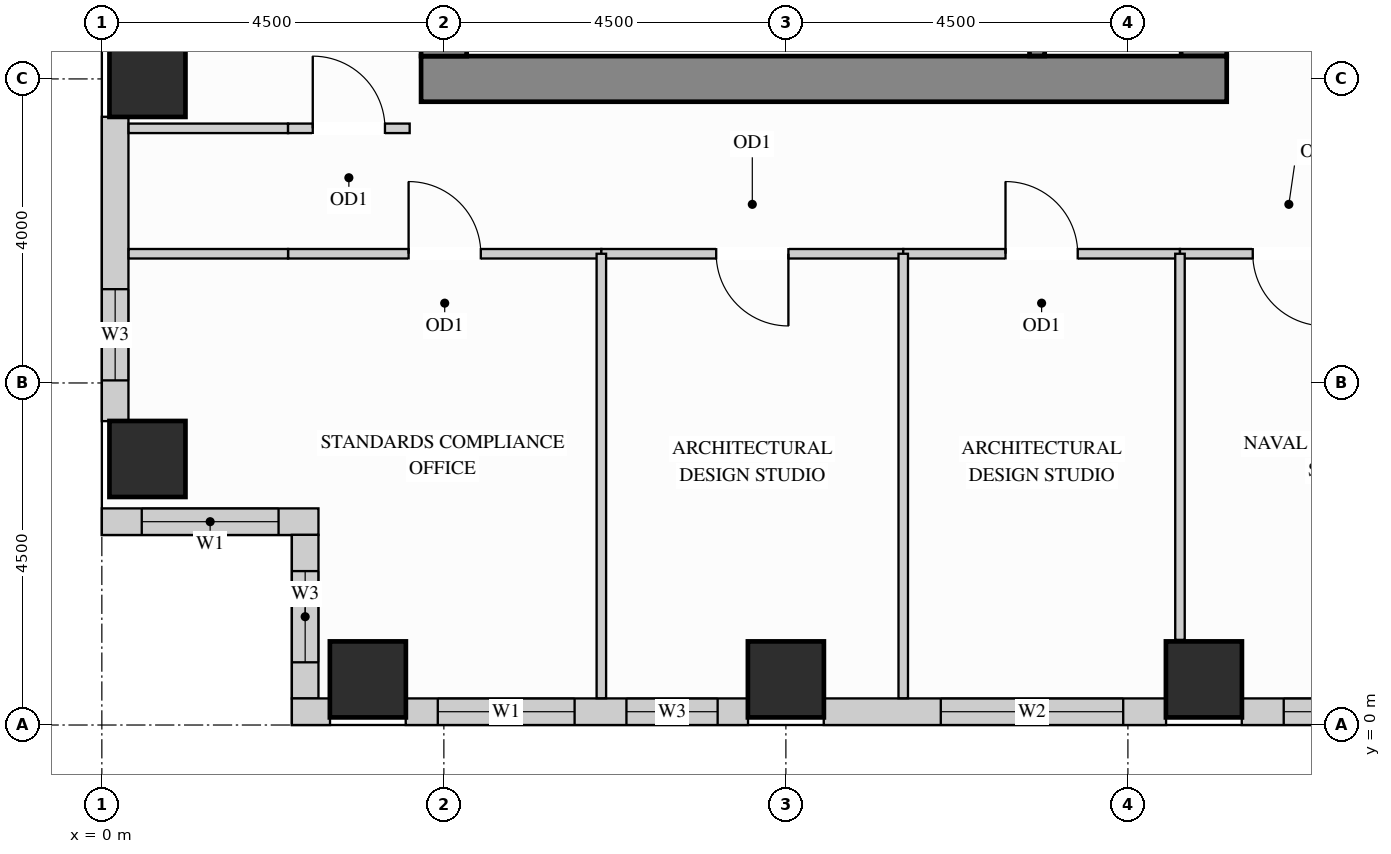
"""IFC4 building model, lengths in metres.
Left out: names, types, materials, properties, quantities, classifications, styles, units other than length and angle.
Written with IfcOpenShell. Run it as: python <this file> out.ifc"""

import sys

from ifc_helpers import new_model, si_unit, direction, frame, frame_2d, origin, origin_2d, place, context, subcontext, project, spatial, rectangle, extrude, source, transform, mapped, element, fill, save


model = new_model("IFC4")
c1 = context("Model", 3, precision=1e-05, world=origin(), true_north=direction((0.0, 1.0)))
c2 = subcontext(c1, "Body", "Model", "MODEL_VIEW")
j1 = project(units=[si_unit("LENGTHUNIT", "METRE"), si_unit("PLANEANGLEUNIT", "RADIAN")], contexts=[c1])
p1 = place(None, origin())
s1 = spatial("IfcSite", under=j1, at=p1, CompositionType="ELEMENT")
p2 = place(p1, origin())
s2 = spatial("IfcBuilding", under=s1, at=p2, CompositionType="ELEMENT")
p3 = place(p2, frame((0.0, 0.0, 175.5)))
s3 = spatial("IfcBuildingStorey", under=s2, at=p3, CompositionType="ELEMENT", Elevation=175.5)
m1 = source(origin(), c2, "Body", "SweptSolid", [
    extrude(rectangle(XDim=1.0, YDim=1.0, at=origin_2d()), origin(), (0.0, 0.0, 1.0), 3.4),
])
for number, where, z_axis, x_axis in (
    (1, (14.5, 0.6, 0.0), (0.0, 0.0, 1.0), (1.0, 0.0, 0.0)),
    (2, (3.5, 0.6, 0.0), (0.0, 0.0, 1.0), (1.0, 0.0, 0.0)),
    (3, (9.0, 0.6, 0.0), (0.0, 0.0, 1.0), (1.0, 0.0, 0.0)),
    (4, (0.6, 3.5, 0.0), (0.0, 0.0, 1.0), (1.0, 0.0, 0.0)),
    (5, (0.6, 8.5, 0.0), (0.0, 0.0, 1.0), (1.0, 0.0, 0.0)),
):
    element("IfcColumn", number, at=place(p3, frame(where, z_axis=z_axis, x_axis=x_axis)), inside=s3, PredefinedType="COLUMN", context=c2, shape_type="MappedRepresentation", body=[
        mapped(m1, transform((0.0, 0.0, 0.0), x_axis=(1.0, 0.0, 0.0), y_axis=(0.0, 1.0, 0.0), z_axis=(0.0, 0.0, 1.0))),
    ])
m2 = source(origin(), c2, "Body", "SweptSolid", [
    extrude(rectangle(XDim=10.02, YDim=0.6, at=frame_2d((5.01, 0.0))), origin(), (0.0, 0.0, 1.0), 3.4),
])
p4 = place(p3, frame((14.5, 8.8, 0.0), z_axis=(0.0, 0.0, 1.0), x_axis=(0.0, 1.0, 0.0)))
e6 = element("IfcWall", 6, at=p4, inside=s3, PredefinedType="SHEAR", context=c2, shape_type="MappedRepresentation", body=[
    mapped(m2, transform((0.0, 0.0, 0.0), x_axis=(1.0, 0.0, 0.0), y_axis=(0.0, 1.0, 0.0), z_axis=(0.0, 0.0, 1.0))),
])
m3 = source(origin(), c2, "Body", "SweptSolid", [
    extrude(rectangle(XDim=10.6, YDim=0.6, at=frame_2d((5.3, 0.0))), origin(), (0.0, 0.0, 1.0), 3.4),
])
p5 = place(p3, frame((4.2, 8.5, 0.0), z_axis=(0.0, 0.0, 1.0), x_axis=(1.0, 0.0, 0.0)))
e7 = element("IfcWall", 7, at=p5, inside=s3, PredefinedType="SHEAR", context=c2, shape_type="MappedRepresentation", body=[
    mapped(m3, transform((0.0, 0.0, 0.0), x_axis=(1.0, 0.0, 0.0), y_axis=(0.0, 1.0, 0.0), z_axis=(0.0, 0.0, 1.0))),
])
m4 = source(origin(), c2, "Body", "SweptSolid", [
    extrude(rectangle(XDim=20.4, YDim=0.6, at=frame_2d((10.2, 0.0))), origin(), (0.0, 0.0, 1.0), 3.4),
])
p6 = place(p3, frame((4.5, 8.8, 0.0), z_axis=(0.0, 0.0, 1.0), x_axis=(0.0, 1.0, 0.0)))
e8 = element("IfcWall", 8, at=p6, inside=s3, PredefinedType="SHEAR", context=c2, shape_type="MappedRepresentation", body=[
    mapped(m4, transform((0.0, 0.0, 0.0), x_axis=(1.0, 0.0, 0.0), y_axis=(0.0, 1.0, 0.0), z_axis=(0.0, 0.0, 1.0))),
])
p7 = place(p3, frame((0.175, 8.002, 0.0), z_axis=(0.0, 0.0, 1.0), x_axis=(0.0, -1.0, 0.0)))
e9 = element("IfcWall", 9, at=p7, inside=s3, PredefinedType="SOLIDWALL", context=c2, shape_type="SweptSolid", body=[
    extrude(rectangle(XDim=4.004, YDim=0.35, at=frame_2d((2.002, 0.0))), origin(), (0.0, 0.0, 1.0), 2.612),
])
p8 = place(p7, frame((2.268, 0.0, 0.78)))
e10 = element("IfcOpeningElement", 10, at=p8, cuts=e9, PredefinedType="OPENING", context=c2, shape_type="SweptSolid", body=[
    extrude(rectangle(XDim=1.2, YDim=1.652, at=frame_2d((0.6, 0.826))), frame((0.0, 0.185, 0.0), z_axis=(0.0, -1.0, 0.0), x_axis=(1.0, 0.0, 0.0)), (0.0, 0.0, 1.0), 0.37),
])
p9 = place(p3, frame((0.0, 2.675, 0.0), z_axis=(0.0, 0.0, 1.0), x_axis=(1.0, 0.0, 0.0)))
e11 = element("IfcWall", 11, at=p9, inside=s3, PredefinedType="SOLIDWALL", context=c2, shape_type="SweptSolid", body=[
    extrude(rectangle(XDim=2.85, YDim=0.35, at=frame_2d((1.425, 0.0))), origin(), (0.0, 0.0, 1.0), 3.385),
])
p10 = place(p9, frame((0.525, 0.0, 0.78)))
e12 = element("IfcOpeningElement", 12, at=p10, cuts=e11, PredefinedType="OPENING", context=c2, shape_type="SweptSolid", body=[
    extrude(rectangle(XDim=1.8, YDim=2.1, at=frame_2d((0.9, 1.05))), frame((0.0, 0.185, 0.0), z_axis=(0.0, -1.0, 0.0), x_axis=(1.0, 0.0, 0.0)), (0.0, 0.0, 1.0), 0.37),
])
p11 = place(p3, frame((2.675, 2.502, 0.0), z_axis=(0.0, 0.0, 1.0), x_axis=(0.0, -1.0, 0.0)))
e13 = element("IfcWall", 13, at=p11, inside=s3, PredefinedType="SOLIDWALL", context=c2, shape_type="SweptSolid", body=[
    extrude(rectangle(XDim=2.154, YDim=0.35, at=frame_2d((1.077, 0.0))), origin(), (0.0, 0.0, 1.0), 3.385),
])
p12 = place(p11, frame((0.477, 0.0, 0.78)))
e14 = element("IfcOpeningElement", 14, at=p12, cuts=e13, PredefinedType="OPENING", context=c2, shape_type="SweptSolid", body=[
    extrude(rectangle(XDim=1.2, YDim=2.1, at=frame_2d((0.6, 1.05))), frame((0.0, 0.185, 0.0), z_axis=(0.0, -1.0, 0.0), x_axis=(1.0, 0.0, 0.0)), (0.0, 0.0, 1.0), 0.37),
])
m5 = source(origin(), c2, "Body", "SweptSolid", [
    extrude(rectangle(XDim=0.502, YDim=0.35, at=frame_2d((0.251, 0.0))), origin(), (0.0, 0.0, 1.0), 3.385),
])
p13 = place(p3, frame((2.5, 0.175, 0.0), z_axis=(0.0, 0.0, 1.0), x_axis=(1.0, 0.0, 0.0)))
e15 = element("IfcWall", 15, at=p13, inside=s3, PredefinedType="SOLIDWALL", context=c2, shape_type="MappedRepresentation", body=[
    mapped(m5, transform((0.0, 0.0, 0.0), x_axis=(1.0, 0.0, 0.0), y_axis=(0.0, 1.0, 0.0), z_axis=(0.0, 0.0, 1.0))),
])
p14 = place(p3, frame((3.998, 0.175, 0.0), z_axis=(0.0, 0.0, 1.0), x_axis=(1.0, 0.0, 0.0)))
e16 = element("IfcWall", 16, at=p14, inside=s3, PredefinedType="SOLIDWALL", context=c2, shape_type="SweptSolid", body=[
    extrude(rectangle(XDim=4.504, YDim=0.35, at=frame_2d((2.252, 0.0))), origin(), (0.0, 0.0, 1.0), 2.612),
])
p15 = place(p14, frame((0.422, 0.0, 0.78)))
e17 = element("IfcOpeningElement", 17, at=p15, cuts=e16, PredefinedType="OPENING", context=c2, shape_type="SweptSolid", body=[
    extrude(rectangle(XDim=1.8, YDim=1.652, at=frame_2d((0.9, 0.826))), frame((0.0, 0.185, 0.0), z_axis=(0.0, -1.0, 0.0), x_axis=(1.0, 0.0, 0.0)), (0.0, 0.0, 1.0), 0.37),
])
p16 = place(p14, frame((2.904, 0.0, 0.78)))
e18 = element("IfcOpeningElement", 18, at=p16, cuts=e16, PredefinedType="OPENING", context=c2, shape_type="SweptSolid", body=[
    extrude(rectangle(XDim=1.2, YDim=1.652, at=frame_2d((0.6, 0.826))), frame((0.0, 0.185, 0.0), z_axis=(0.0, -1.0, 0.0), x_axis=(1.0, 0.0, 0.0)), (0.0, 0.0, 1.0), 0.37),
])
p17 = place(p3, frame((9.498, 0.175, 0.0), z_axis=(0.0, 0.0, 1.0), x_axis=(1.0, 0.0, 0.0)))
e19 = element("IfcWall", 19, at=p17, inside=s3, PredefinedType="SOLIDWALL", context=c2, shape_type="SweptSolid", body=[
    extrude(rectangle(XDim=4.504, YDim=0.35, at=frame_2d((2.252, 0.0))), origin(), (0.0, 0.0, 1.0), 2.612),
])
p18 = place(p17, frame((1.54, 0.0, 0.78)))
e20 = element("IfcOpeningElement", 20, at=p18, cuts=e19, PredefinedType="OPENING", context=c2, shape_type="SweptSolid", body=[
    extrude(rectangle(XDim=2.4, YDim=1.652, at=frame_2d((1.2, 0.826))), frame((0.0, 0.185, 0.0), z_axis=(0.0, -1.0, 0.0), x_axis=(1.0, 0.0, 0.0)), (0.0, 0.0, 1.0), 0.37),
])
p19 = place(p3, frame((14.998, 0.175, 0.0), z_axis=(0.0, 0.0, 1.0), x_axis=(1.0, 0.0, 0.0)))
e21 = element("IfcWall", 21, at=p19, inside=s3, PredefinedType="SOLIDWALL", context=c2, shape_type="SweptSolid", body=[
    extrude(rectangle(XDim=3.504, YDim=0.35, at=frame_2d((1.752, 0.0))), origin(), (0.0, 0.0, 1.0), 2.612),
])
p20 = place(p19, frame((0.552, 0.0, 0.78)))
e22 = element("IfcOpeningElement", 22, at=p20, cuts=e21, PredefinedType="OPENING", context=c2, shape_type="SweptSolid", body=[
    extrude(rectangle(XDim=2.4, YDim=1.652, at=frame_2d((1.2, 0.826))), frame((0.0, 0.185, 0.0), z_axis=(0.0, -1.0, 0.0), x_axis=(1.0, 0.0, 0.0)), (0.0, 0.0, 1.0), 0.37),
])
m6 = source(origin(), c2, "Body", "SweptSolid", [
    extrude(rectangle(XDim=2.098, YDim=0.125, at=frame_2d((1.049, 0.0))), origin(), (0.0, 0.0, 1.0), 3.385),
])
p21 = place(p3, frame((0.352, 7.85, 0.0), z_axis=(0.0, 0.0, 1.0), x_axis=(1.0, 0.0, 0.0)))
e23 = element("IfcWall", 23, at=p21, inside=s3, PredefinedType="PARTITIONING", context=c2, shape_type="MappedRepresentation", body=[
    mapped(m6, transform((0.0, 0.0, 0.0), x_axis=(1.0, 0.0, 0.0), y_axis=(0.0, 1.0, 0.0), z_axis=(0.0, 0.0, 1.0))),
])
p22 = place(p3, frame((2.45, 7.85, 0.0), z_axis=(0.0, 0.0, 1.0), x_axis=(1.0, 0.0, 0.0)))
e24 = element("IfcWall", 24, at=p22, inside=s3, PredefinedType="PARTITIONING", context=c2, shape_type="SweptSolid", body=[
    extrude(rectangle(XDim=1.6, YDim=0.125, at=frame_2d((0.8, 0.0))), origin(), (0.0, 0.0, 1.0), 3.385),
])
p23 = place(p22, frame((0.325, 0.0, 0.0)))
e25 = element("IfcOpeningElement", 25, at=p23, cuts=e24, PredefinedType="OPENING", context=c2, shape_type="SweptSolid", body=[
    extrude(rectangle(XDim=0.95, YDim=2.15, at=frame_2d((0.475, 1.075))), frame((0.0, 0.073, 0.0), z_axis=(0.0, -1.0, 0.0), x_axis=(1.0, 0.0, 0.0)), (0.0, 0.0, 1.0), 0.145),
])
p24 = place(p3, frame((2.45, 6.2, 0.0), z_axis=(0.0, 0.0, 1.0), x_axis=(1.0, 0.0, 0.0)))
e26 = element("IfcWall", 26, at=p24, inside=s3, PredefinedType="PARTITIONING", context=c2, shape_type="SweptSolid", body=[
    extrude(rectangle(XDim=4.122, YDim=0.125, at=frame_2d((2.061, 0.0))), origin(), (0.0, 0.0, 1.0), 2.848),
])
p25 = place(p24, frame((1.586, 0.0, 0.0)))
e27 = element("IfcOpeningElement", 27, at=p25, cuts=e26, PredefinedType="OPENING", context=c2, shape_type="SweptSolid", body=[
    extrude(rectangle(XDim=0.95, YDim=2.15, at=frame_2d((0.475, 1.075))), frame((0.0, 0.073, 0.0), z_axis=(0.0, -1.0, 0.0), x_axis=(1.0, 0.0, 0.0)), (0.0, 0.0, 1.0), 0.145),
])
p26 = place(p3, frame((6.572, 6.2, 0.0), z_axis=(0.0, 0.0, 1.0), x_axis=(1.0, 0.0, 0.0)))
e28 = element("IfcWall", 28, at=p26, inside=s3, PredefinedType="PARTITIONING", context=c2, shape_type="SweptSolid", body=[
    extrude(rectangle(XDim=3.972, YDim=0.125, at=frame_2d((1.986, 0.0))), origin(), (0.0, 0.0, 1.0), 2.848),
])
p27 = place(p26, frame((1.511, 0.0, 0.0)))
e29 = element("IfcOpeningElement", 29, at=p27, cuts=e28, PredefinedType="OPENING", context=c2, shape_type="SweptSolid", body=[
    extrude(rectangle(XDim=0.95, YDim=2.15, at=frame_2d((0.475, 1.075))), frame((0.0, 0.073, 0.0), z_axis=(0.0, -1.0, 0.0), x_axis=(1.0, 0.0, 0.0)), (0.0, 0.0, 1.0), 0.145),
])
p28 = place(p3, frame((10.544, 6.2, 0.0), z_axis=(0.0, 0.0, 1.0), x_axis=(1.0, 0.0, 0.0)))
e30 = element("IfcWall", 30, at=p28, inside=s3, PredefinedType="PARTITIONING", context=c2, shape_type="SweptSolid", body=[
    extrude(rectangle(XDim=3.641, YDim=0.125, at=frame_2d((1.821, 0.0))), origin(), (0.0, 0.0, 1.0), 2.848),
])
p29 = place(p28, frame((1.345, 0.0, 0.0)))
e31 = element("IfcOpeningElement", 31, at=p29, cuts=e30, PredefinedType="OPENING", context=c2, shape_type="SweptSolid", body=[
    extrude(rectangle(XDim=0.95, YDim=2.15, at=frame_2d((0.475, 1.075))), frame((0.0, 0.073, 0.0), z_axis=(0.0, -1.0, 0.0), x_axis=(1.0, 0.0, 0.0)), (0.0, 0.0, 1.0), 0.145),
])
p30 = place(p3, frame((14.185, 6.2, 0.0), z_axis=(0.0, 0.0, 1.0), x_axis=(1.0, 0.0, 0.0)))
e32 = element("IfcWall", 32, at=p30, inside=s3, PredefinedType="PARTITIONING", context=c2, shape_type="SweptSolid", body=[
    extrude(rectangle(XDim=2.865, YDim=0.125, at=frame_2d((1.433, 0.0))), origin(), (0.0, 0.0, 1.0), 2.848),
])
p31 = place(p30, frame((0.958, 0.0, 0.0)))
e33 = element("IfcOpeningElement", 33, at=p31, cuts=e32, PredefinedType="OPENING", context=c2, shape_type="SweptSolid", body=[
    extrude(rectangle(XDim=0.95, YDim=2.15, at=frame_2d((0.475, 1.075))), frame((0.0, 0.073, 0.0), z_axis=(0.0, -1.0, 0.0), x_axis=(1.0, 0.0, 0.0)), (0.0, 0.0, 1.0), 0.145),
])
m7 = source(origin(), c2, "Body", "SweptSolid", [
    extrude(rectangle(XDim=2.098, YDim=0.125, at=frame_2d((1.049, 0.0))), origin(), (0.0, 0.0, 1.0), 2.848),
])
p32 = place(p3, frame((0.352, 6.2, 0.0), z_axis=(0.0, 0.0, 1.0), x_axis=(1.0, 0.0, 0.0)))
e34 = element("IfcWall", 34, at=p32, inside=s3, PredefinedType="PARTITIONING", context=c2, shape_type="MappedRepresentation", body=[
    mapped(m7, transform((0.0, 0.0, 0.0), x_axis=(1.0, 0.0, 0.0), y_axis=(0.0, 1.0, 0.0), z_axis=(0.0, 0.0, 1.0))),
])
m8 = source(origin(), c2, "Body", "SweptSolid", [
    extrude(rectangle(XDim=5.848, YDim=0.125, at=frame_2d((2.924, 0.0))), origin(), (0.0, 0.0, 1.0), 3.385),
])
for number, where, z_axis, x_axis in (
    (35, (6.572, 0.352, 0.0), (0.0, 0.0, 1.0), (0.0, 1.0, 0.0)),
    (36, (10.544, 0.352, 0.0), (0.0, 0.0, 1.0), (0.0, 1.0, 0.0)),
):
    element("IfcWall", number, at=place(p3, frame(where, z_axis=z_axis, x_axis=x_axis)), inside=s3, PredefinedType="PARTITIONING", context=c2, shape_type="MappedRepresentation", body=[
        mapped(m8, transform((0.0, 0.0, 0.0), x_axis=(1.0, 0.0, 0.0), y_axis=(0.0, 1.0, 0.0), z_axis=(0.0, 0.0, 1.0))),
    ])
m9 = source(origin(), c2, "Body", "SweptSolid", [
    extrude(rectangle(XDim=5.08, YDim=0.125, at=frame_2d((2.54, 0.0))), origin(), (0.0, 0.0, 1.0), 3.385),
])
p33 = place(p3, frame((14.185, 1.12, 0.0), z_axis=(0.0, 0.0, 1.0), x_axis=(0.0, 1.0, 0.0)))
e37 = element("IfcWall", 37, at=p33, inside=s3, PredefinedType="PARTITIONING", context=c2, shape_type="MappedRepresentation", body=[
    mapped(m9, transform((0.0, 0.0, 0.0), x_axis=(1.0, 0.0, 0.0), y_axis=(0.0, 1.0, 0.0), z_axis=(0.0, 0.0, 1.0))),
])
m10 = source(origin(), c2, "Body", "SweptSolid", [
    extrude(rectangle(XDim=3.753, YDim=0.2, at=frame_2d((1.876, 0.0))), origin(), (0.0, 0.0, 1.0), 3.4),
])
p34 = place(p3, frame((12.305, 8.802, 0.0), z_axis=(0.0, 0.0, 1.0), x_axis=(0.0, 1.0, 0.0)))
e38 = element("IfcWall", 38, at=p34, inside=s3, PredefinedType="SHEAR", context=c2, shape_type="MappedRepresentation", body=[
    mapped(m10, transform((0.0, 0.0, 0.0), x_axis=(1.0, 0.0, 0.0), y_axis=(0.0, 1.0, 0.0), z_axis=(0.0, 0.0, 1.0))),
])
m11 = source(origin(), c2, "Body", "SweptSolid", [
    extrude(rectangle(XDim=0.95, YDim=2.15, at=frame_2d((0.475, 1.075))), frame((0.0, 0.025, 0.0), z_axis=(0.0, -1.0, 0.0), x_axis=(1.0, 0.0, 0.0)), (0.0, 0.0, 1.0), 0.05),
])
p35 = place(p25, origin())
e39 = element("IfcDoor", 39, at=p35, inside=s3, OperationType="SINGLE_SWING_LEFT", PredefinedType="DOOR", context=c2, shape_type="MappedRepresentation", body=[
    mapped(m11, transform((0.0, 0.0, 0.0), x_axis=(1.0, 0.0, 0.0), y_axis=(0.0, 1.0, 0.0), z_axis=(0.0, 0.0, 1.0))),
])
fill(e27, e39)
p36 = place(p27, origin())
e40 = element("IfcDoor", 40, at=p36, inside=s3, OperationType="SINGLE_SWING_RIGHT", PredefinedType="DOOR", context=c2, shape_type="MappedRepresentation", body=[
    mapped(m11, transform((0.0, 0.0, 0.0), x_axis=(1.0, 0.0, 0.0), y_axis=(0.0, 1.0, 0.0), z_axis=(0.0, 0.0, 1.0))),
])
fill(e29, e40)
p37 = place(p29, origin())
e41 = element("IfcDoor", 41, at=p37, inside=s3, OperationType="SINGLE_SWING_LEFT", PredefinedType="DOOR", context=c2, shape_type="MappedRepresentation", body=[
    mapped(m11, transform((0.0, 0.0, 0.0), x_axis=(1.0, 0.0, 0.0), y_axis=(0.0, 1.0, 0.0), z_axis=(0.0, 0.0, 1.0))),
])
fill(e31, e41)
p38 = place(p31, origin())
e42 = element("IfcDoor", 42, at=p38, inside=s3, OperationType="SINGLE_SWING_RIGHT", PredefinedType="DOOR", context=c2, shape_type="MappedRepresentation", body=[
    mapped(m11, transform((0.0, 0.0, 0.0), x_axis=(1.0, 0.0, 0.0), y_axis=(0.0, 1.0, 0.0), z_axis=(0.0, 0.0, 1.0))),
])
fill(e33, e42)
p39 = place(p23, origin())
e43 = element("IfcDoor", 43, at=p39, inside=s3, OperationType="SINGLE_SWING_LEFT", PredefinedType="DOOR", context=c2, shape_type="MappedRepresentation", body=[
    mapped(m11, transform((0.0, 0.0, 0.0), x_axis=(1.0, 0.0, 0.0), y_axis=(0.0, 1.0, 0.0), z_axis=(0.0, 0.0, 1.0))),
])
fill(e25, e43)
m12 = source(origin(), c2, "Body", "SweptSolid", [
    extrude(rectangle(XDim=1.8, YDim=2.1, at=frame_2d((0.9, 1.05))), frame((0.0, 0.03, 0.0), z_axis=(0.0, -1.0, 0.0), x_axis=(1.0, 0.0, 0.0)), (0.0, 0.0, 1.0), 0.06),
])
p40 = place(p10, origin())
e44 = element("IfcWindow", 44, at=p40, inside=s3, PartitioningType="SINGLE_PANEL", PredefinedType="WINDOW", context=c2, shape_type="MappedRepresentation", body=[
    mapped(m12, transform((0.0, 0.0, 0.0), x_axis=(1.0, 0.0, 0.0), y_axis=(0.0, 1.0, 0.0), z_axis=(0.0, 0.0, 1.0))),
])
fill(e12, e44)
m13 = source(origin(), c2, "Body", "SweptSolid", [
    extrude(rectangle(XDim=1.8, YDim=1.652, at=frame_2d((0.9, 0.826))), frame((0.0, 0.03, 0.0), z_axis=(0.0, -1.0, 0.0), x_axis=(1.0, 0.0, 0.0)), (0.0, 0.0, 1.0), 0.06),
])
p41 = place(p15, origin())
e45 = element("IfcWindow", 45, at=p41, inside=s3, PartitioningType="SINGLE_PANEL", PredefinedType="WINDOW", context=c2, shape_type="MappedRepresentation", body=[
    mapped(m13, transform((0.0, 0.0, 0.0), x_axis=(1.0, 0.0, 0.0), y_axis=(0.0, 1.0, 0.0), z_axis=(0.0, 0.0, 1.0))),
])
fill(e17, e45)
m14 = source(origin(), c2, "Body", "SweptSolid", [
    extrude(rectangle(XDim=2.4, YDim=1.652, at=frame_2d((1.2, 0.826))), frame((0.0, 0.03, 0.0), z_axis=(0.0, -1.0, 0.0), x_axis=(1.0, 0.0, 0.0)), (0.0, 0.0, 1.0), 0.06),
])
p42 = place(p18, origin())
e46 = element("IfcWindow", 46, at=p42, inside=s3, PartitioningType="SINGLE_PANEL", PredefinedType="WINDOW", context=c2, shape_type="MappedRepresentation", body=[
    mapped(m14, transform((0.0, 0.0, 0.0), x_axis=(1.0, 0.0, 0.0), y_axis=(0.0, 1.0, 0.0), z_axis=(0.0, 0.0, 1.0))),
])
fill(e20, e46)
p43 = place(p20, origin())
e47 = element("IfcWindow", 47, at=p43, inside=s3, PartitioningType="SINGLE_PANEL", PredefinedType="WINDOW", context=c2, shape_type="MappedRepresentation", body=[
    mapped(m14, transform((0.0, 0.0, 0.0), x_axis=(1.0, 0.0, 0.0), y_axis=(0.0, 1.0, 0.0), z_axis=(0.0, 0.0, 1.0))),
])
fill(e22, e47)
m15 = source(origin(), c2, "Body", "SweptSolid", [
    extrude(rectangle(XDim=1.2, YDim=1.652, at=frame_2d((0.6, 0.826))), frame((0.0, 0.03, 0.0), z_axis=(0.0, -1.0, 0.0), x_axis=(1.0, 0.0, 0.0)), (0.0, 0.0, 1.0), 0.06),
])
p44 = place(p8, origin())
e48 = element("IfcWindow", 48, at=p44, inside=s3, PartitioningType="SINGLE_PANEL", PredefinedType="WINDOW", context=c2, shape_type="MappedRepresentation", body=[
    mapped(m15, transform((0.0, 0.0, 0.0), x_axis=(1.0, 0.0, 0.0), y_axis=(0.0, 1.0, 0.0), z_axis=(0.0, 0.0, 1.0))),
])
fill(e10, e48)
m16 = source(origin(), c2, "Body", "SweptSolid", [
    extrude(rectangle(XDim=1.2, YDim=2.1, at=frame_2d((0.6, 1.05))), frame((0.0, 0.03, 0.0), z_axis=(0.0, -1.0, 0.0), x_axis=(1.0, 0.0, 0.0)), (0.0, 0.0, 1.0), 0.06),
])
p45 = place(p12, origin())
e49 = element("IfcWindow", 49, at=p45, inside=s3, PartitioningType="SINGLE_PANEL", PredefinedType="WINDOW", context=c2, shape_type="MappedRepresentation", body=[
    mapped(m16, transform((0.0, 0.0, 0.0), x_axis=(1.0, 0.0, 0.0), y_axis=(0.0, 1.0, 0.0), z_axis=(0.0, 0.0, 1.0))),
])
fill(e14, e49)
p46 = place(p16, origin())
e50 = element("IfcWindow", 50, at=p46, inside=s3, PartitioningType="SINGLE_PANEL", PredefinedType="WINDOW", context=c2, shape_type="MappedRepresentation", body=[
    mapped(m15, transform((0.0, 0.0, 0.0), x_axis=(1.0, 0.0, 0.0), y_axis=(0.0, 1.0, 0.0), z_axis=(0.0, 0.0, 1.0))),
])
fill(e18, e50)
save(model, sys.argv[1])
